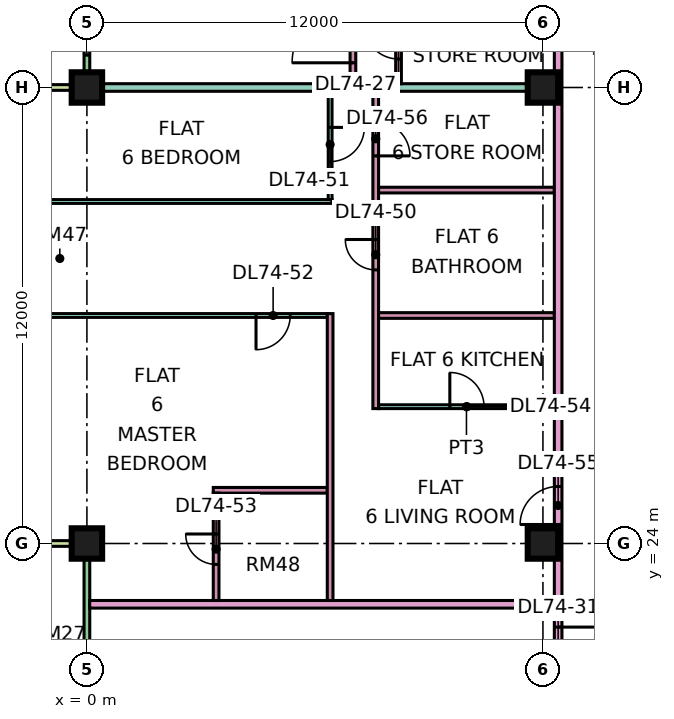
"""IFC4 building model, lengths in metres.
Left out: names, types, materials, properties, quantities, classifications, styles, units other than length and angle.
Written with IfcOpenShell. Run it as: python <this file> out.ifc"""

import sys

from ifc_helpers import new_model, si_unit, direction, frame, frame_2d, origin, origin_2d, place, context, subcontext, project, spatial, rectangle, extrude, element, fill, save


model = new_model("IFC4")
c1 = context("Model", 3, precision=1e-05, world=origin(), true_north=direction((0.0, 1.0)))
c2 = subcontext(c1, "Body", "Model", "MODEL_VIEW")
j1 = project(units=[si_unit("LENGTHUNIT", "METRE"), si_unit("PLANEANGLEUNIT", "RADIAN")], contexts=[c1])
p1 = place(None, origin())
s1 = spatial("IfcSite", under=j1, at=p1, CompositionType="ELEMENT")
p2 = place(p1, origin())
s2 = spatial("IfcBuilding", under=s1, at=p2, CompositionType="ELEMENT")
p3 = place(p2, frame((0.0, 0.0, 314.65)))
s3 = spatial("IfcBuildingStorey", under=s2, at=p3, CompositionType="ELEMENT", Elevation=314.65)
p4 = place(p3, frame((0.0, 24.0, 0.0), z_axis=(0.0, 0.0, 1.0), x_axis=(1.0, 0.0, 0.0)))
e1 = element("IfcColumn", 1, at=p4, inside=s3, PredefinedType="COLUMN", context=c2, shape_type="SweptSolid", body=[
    extrude(rectangle(XDim=0.8, YDim=0.8, at=origin_2d()), origin(), (0.0, 0.0, 1.0), 3.75),
])
p5 = place(p3, frame((0.0, 36.0, 0.0), z_axis=(0.0, 0.0, 1.0), x_axis=(1.0, 0.0, 0.0)))
e2 = element("IfcColumn", 2, at=p5, inside=s3, PredefinedType="COLUMN", context=c2, shape_type="SweptSolid", body=[
    extrude(rectangle(XDim=0.8, YDim=0.8, at=origin_2d()), origin(), (0.0, 0.0, 1.0), 3.75),
])
for number, where, z_axis, x_axis in (
    (3, (12.0, 24.0, 0.0), (0.0, 0.0, 1.0), (1.0, 0.0, 0.0)),
    (4, (12.0, 36.0, 0.0), (0.0, 0.0, 1.0), (1.0, 0.0, 0.0)),
):
    element("IfcColumn", number, at=place(p3, frame(where, z_axis=z_axis, x_axis=x_axis)), inside=s3, PredefinedType="COLUMN", context=c2, shape_type="SweptSolid", body=[
        extrude(rectangle(XDim=0.8, YDim=0.8, at=origin_2d()), origin(), (0.0, 0.0, 1.0), 3.75),
    ])
p6 = place(p3, frame((0.0, 47.925, 0.0), z_axis=(0.0, 0.0, 1.0), x_axis=(0.0, -1.0, 0.0)))
e5 = element("IfcWall", 5, at=p6, inside=s3, PredefinedType="SOLIDWALL", context=c2, shape_type="SweptSolid", body=[
    extrude(rectangle(XDim=11.85, YDim=0.15, at=frame_2d((5.925, 0.0))), origin(), (0.0, 0.0, 1.0), 3.35),
])
p7 = place(p6, frame((0.613, 0.0, 0.0)))
e6 = element("IfcOpeningElement", 6, at=p7, cuts=e5, PredefinedType="OPENING", context=c2, shape_type="SweptSolid", body=[
    extrude(rectangle(XDim=1.2, YDim=2.4, at=frame_2d((0.6, 1.2))), frame((0.0, 0.085, 0.0), z_axis=(0.0, -1.0, 0.0), x_axis=(1.0, 0.0, 0.0)), (0.0, 0.0, 1.0), 0.17),
])
p8 = place(p6, frame((4.675, 0.0, 0.45)))
e7 = element("IfcOpeningElement", 7, at=p8, cuts=e5, PredefinedType="OPENING", context=c2, shape_type="SweptSolid", body=[
    extrude(rectangle(XDim=3.0, YDim=2.4, at=frame_2d((1.5, 1.2))), frame((0.0, 0.085, 0.0), z_axis=(0.0, -1.0, 0.0), x_axis=(1.0, 0.0, 0.0)), (0.0, 0.0, 1.0), 0.17),
])
p9 = place(p6, frame((9.275, 0.0, 0.45)))
e8 = element("IfcOpeningElement", 8, at=p9, cuts=e5, PredefinedType="OPENING", context=c2, shape_type="SweptSolid", body=[
    extrude(rectangle(XDim=1.8, YDim=2.4, at=frame_2d((0.9, 1.2))), frame((0.0, 0.085, 0.0), z_axis=(0.0, -1.0, 0.0), x_axis=(1.0, 0.0, 0.0)), (0.0, 0.0, 1.0), 0.17),
])
p10 = place(p3, frame((-1.5, 36.0, 0.0), z_axis=(0.0, 0.0, 1.0), x_axis=(1.0, 0.0, 0.0)))
e9 = element("IfcWall", 9, at=p10, inside=s3, PredefinedType="SOLIDWALL", context=c2, shape_type="SweptSolid", body=[
    extrude(rectangle(XDim=1.5, YDim=0.15, at=frame_2d((0.75, 0.0))), origin(), (0.0, 0.0, 1.0), 3.35),
])
p11 = place(p3, frame((0.0, 23.925, 0.0), z_axis=(0.0, 0.0, 1.0), x_axis=(0.0, -1.0, 0.0)))
e10 = element("IfcWall", 10, at=p11, inside=s3, PredefinedType="SOLIDWALL", context=c2, shape_type="SweptSolid", body=[
    extrude(rectangle(XDim=11.35, YDim=0.15, at=frame_2d((5.675, 0.0))), origin(), (0.0, 0.0, 1.0), 3.35),
])
p12 = place(p11, frame((6.738, 0.0, 0.0)))
e11 = element("IfcOpeningElement", 11, at=p12, cuts=e10, PredefinedType="OPENING", context=c2, shape_type="SweptSolid", body=[
    extrude(rectangle(XDim=1.8, YDim=2.4, at=frame_2d((0.9, 1.2))), frame((0.0, 0.085, 0.0), z_axis=(0.0, -1.0, 0.0), x_axis=(1.0, 0.0, 0.0)), (0.0, 0.0, 1.0), 0.17),
])
p13 = place(p3, frame((-1.5, 24.0, 0.0), z_axis=(0.0, 0.0, 1.0), x_axis=(1.0, 0.0, 0.0)))
e12 = element("IfcWall", 12, at=p13, inside=s3, PredefinedType="SOLIDWALL", context=c2, shape_type="SweptSolid", body=[
    extrude(rectangle(XDim=1.5, YDim=0.15, at=frame_2d((0.75, 0.0))), origin(), (0.0, 0.0, 1.0), 3.35),
])
p14 = place(p3, frame((-1.35, 30.0, 0.0), z_axis=(0.0, 0.0, 1.0), x_axis=(1.0, 0.0, 0.0)))
e13 = element("IfcWall", 13, at=p14, inside=s3, PredefinedType="PARTITIONING", context=c2, shape_type="SweptSolid", body=[
    extrude(rectangle(XDim=7.675, YDim=0.1, at=frame_2d((3.837, 0.0))), origin(), (0.0, 0.0, 1.0), 3.35),
])
p15 = place(p14, frame((5.8, 0.0, 0.0)))
e14 = element("IfcOpeningElement", 14, at=p15, cuts=e13, PredefinedType="OPENING", context=c2, shape_type="SweptSolid", body=[
    extrude(rectangle(XDim=0.9, YDim=2.1, at=frame_2d((0.45, 1.05))), frame((0.0, 0.06, 0.0), z_axis=(0.0, -1.0, 0.0), x_axis=(1.0, 0.0, 0.0)), (0.0, 0.0, 1.0), 0.12),
])
p16 = place(p3, frame((-1.35, 33.0, 0.0), z_axis=(0.0, 0.0, 1.0), x_axis=(1.0, 0.0, 0.0)))
e15 = element("IfcWall", 15, at=p16, inside=s3, PredefinedType="PARTITIONING", context=c2, shape_type="SweptSolid", body=[
    extrude(rectangle(XDim=7.8, YDim=0.1, at=frame_2d((3.9, 0.0))), origin(), (0.0, 0.0, 1.0), 3.35),
])
e16 = element("IfcWall", 16, at=p5, inside=s3, PredefinedType="PARTITIONING", context=c2, shape_type="SweptSolid", body=[
    extrude(rectangle(XDim=12.3, YDim=0.2, at=frame_2d((6.15, 0.0))), origin(), (0.0, 0.0, 1.0), 3.35),
])
p17 = place(p3, frame((0.074, 22.4, 0.0), z_axis=(0.0, 0.0, 1.0), x_axis=(1.0, 0.0, 0.0)))
e17 = element("IfcWall", 17, at=p17, inside=s3, PredefinedType="PARTITIONING", context=c2, shape_type="SweptSolid", body=[
    extrude(rectangle(XDim=12.226, YDim=0.2, at=frame_2d((6.113, 0.0))), origin(), (0.0, 0.0, 1.0), 3.35),
])
p18 = place(p3, frame((3.325, 25.4, 0.0), z_axis=(0.0, 0.0, 1.0), x_axis=(1.0, 0.0, 0.0)))
e18 = element("IfcWall", 18, at=p18, inside=s3, PredefinedType="PARTITIONING", context=c2, shape_type="SweptSolid", body=[
    extrude(rectangle(XDim=3.0, YDim=0.15, at=frame_2d((1.5, 0.0))), origin(), (0.0, 0.0, 1.0), 3.35),
])
p19 = place(p3, frame((3.4, 22.5, 0.0), z_axis=(0.0, 0.0, 1.0), x_axis=(0.0, 1.0, 0.0)))
e19 = element("IfcWall", 19, at=p19, inside=s3, PredefinedType="PARTITIONING", context=c2, shape_type="SweptSolid", body=[
    extrude(rectangle(XDim=2.825, YDim=0.15, at=frame_2d((1.413, 0.0))), origin(), (0.0, 0.0, 1.0), 3.35),
])
p20 = place(p19, frame((0.95, 0.0, 0.0)))
e20 = element("IfcOpeningElement", 20, at=p20, cuts=e19, PredefinedType="OPENING", context=c2, shape_type="SweptSolid", body=[
    extrude(rectangle(XDim=0.8, YDim=2.1, at=frame_2d((0.4, 1.05))), frame((0.0, 0.085, 0.0), z_axis=(0.0, -1.0, 0.0), x_axis=(1.0, 0.0, 0.0)), (0.0, 0.0, 1.0), 0.17),
])
p21 = place(p3, frame((6.4, 22.5, 0.0), z_axis=(0.0, 0.0, 1.0), x_axis=(0.0, 1.0, 0.0)))
e21 = element("IfcWall", 21, at=p21, inside=s3, PredefinedType="PARTITIONING", context=c2, shape_type="SweptSolid", body=[
    extrude(rectangle(XDim=7.55, YDim=0.15, at=frame_2d((3.775, 0.0))), origin(), (0.0, 0.0, 1.0), 3.35),
])
p22 = place(p3, frame((6.4, 33.05, 0.0), z_axis=(0.0, 0.0, 1.0), x_axis=(0.0, 1.0, 0.0)))
e22 = element("IfcWall", 22, at=p22, inside=s3, PredefinedType="PARTITIONING", context=c2, shape_type="SweptSolid", body=[
    extrude(rectangle(XDim=2.85, YDim=0.1, at=frame_2d((1.425, 0.0))), origin(), (0.0, 0.0, 1.0), 3.35),
])
p23 = place(p22, frame((1.0, 0.0, 0.0)))
e23 = element("IfcOpeningElement", 23, at=p23, cuts=e22, PredefinedType="OPENING", context=c2, shape_type="SweptSolid", body=[
    extrude(rectangle(XDim=0.9, YDim=2.1, at=frame_2d((0.45, 1.05))), frame((0.0, 0.06, 0.0), z_axis=(0.0, -1.0, 0.0), x_axis=(1.0, 0.0, 0.0)), (0.0, 0.0, 1.0), 0.12),
])
p24 = place(p3, frame((7.0, 36.1, 0.0), z_axis=(0.0, 0.0, 1.0), x_axis=(0.0, 1.0, 0.0)))
e24 = element("IfcWall", 24, at=p24, inside=s3, PredefinedType="PARTITIONING", context=c2, shape_type="SweptSolid", body=[
    extrude(rectangle(XDim=8.95, YDim=0.15, at=frame_2d((4.475, 0.0))), origin(), (0.0, 0.0, 1.0), 3.35),
])
p25 = place(p24, frame((6.95, 0.0, 0.0)))
e25 = element("IfcOpeningElement", 25, at=p25, cuts=e24, PredefinedType="OPENING", context=c2, shape_type="SweptSolid", body=[
    extrude(rectangle(XDim=0.9, YDim=2.1, at=frame_2d((0.45, 1.05))), frame((0.0, 0.085, 0.0), z_axis=(0.0, -1.0, 0.0), x_axis=(1.0, 0.0, 0.0)), (0.0, 0.0, 1.0), 0.17),
])
p26 = place(p24, frame((0.55, 0.0, 0.0)))
e26 = element("IfcOpeningElement", 26, at=p26, cuts=e24, PredefinedType="OPENING", context=c2, shape_type="SweptSolid", body=[
    extrude(rectangle(XDim=1.6, YDim=2.1, at=frame_2d((0.8, 1.05))), frame((0.0, 0.085, 0.0), z_axis=(0.0, -1.0, 0.0), x_axis=(1.0, 0.0, 0.0)), (0.0, 0.0, 1.0), 0.17),
])
p27 = place(p3, frame((7.6, 27.55, 0.0), z_axis=(0.0, 0.0, 1.0), x_axis=(0.0, 1.0, 0.0)))
e27 = element("IfcWall", 27, at=p27, inside=s3, PredefinedType="PARTITIONING", context=c2, shape_type="SweptSolid", body=[
    extrude(rectangle(XDim=8.35, YDim=0.15, at=frame_2d((4.175, 0.0))), origin(), (0.0, 0.0, 1.0), 3.35),
])
p28 = place(p27, frame((3.65, 0.0, 0.0)))
e28 = element("IfcOpeningElement", 28, at=p28, cuts=e27, PredefinedType="OPENING", context=c2, shape_type="SweptSolid", body=[
    extrude(rectangle(XDim=0.8, YDim=2.1, at=frame_2d((0.4, 1.05))), frame((0.0, 0.085, 0.0), z_axis=(0.0, -1.0, 0.0), x_axis=(1.0, 0.0, 0.0)), (0.0, 0.0, 1.0), 0.17),
])
p29 = place(p27, frame((6.65, 0.0, 0.0)))
e29 = element("IfcOpeningElement", 29, at=p29, cuts=e27, PredefinedType="OPENING", context=c2, shape_type="SweptSolid", body=[
    extrude(rectangle(XDim=0.9, YDim=2.1, at=frame_2d((0.45, 1.05))), frame((0.0, 0.085, 0.0), z_axis=(0.0, -1.0, 0.0), x_axis=(1.0, 0.0, 0.0)), (0.0, 0.0, 1.0), 0.17),
])
p30 = place(p3, frame((7.675, 27.6, 0.0), z_axis=(0.0, 0.0, 1.0), x_axis=(1.0, 0.0, 0.0)))
e30 = element("IfcWall", 30, at=p30, inside=s3, PredefinedType="PARTITIONING", context=c2, shape_type="SweptSolid", body=[
    extrude(rectangle(XDim=4.625, YDim=0.1, at=frame_2d((2.312, 0.0))), origin(), (0.0, 0.0, 1.0), 3.35),
])
p31 = place(p30, frame((1.875, 0.0, 0.0)))
e31 = element("IfcOpeningElement", 31, at=p31, cuts=e30, PredefinedType="OPENING", context=c2, shape_type="SweptSolid", body=[
    extrude(rectangle(XDim=0.9, YDim=2.1, at=frame_2d((0.45, 1.05))), frame((0.0, 0.06, 0.0), z_axis=(0.0, -1.0, 0.0), x_axis=(1.0, 0.0, 0.0)), (0.0, 0.0, 1.0), 0.12),
])
for number, where, z_axis, x_axis in (
    (32, (7.675, 30.0, 0.0), (0.0, 0.0, 1.0), (1.0, 0.0, 0.0)),
    (33, (7.675, 33.3, 0.0), (0.0, 0.0, 1.0), (1.0, 0.0, 0.0)),
):
    element("IfcWall", number, at=place(p3, frame(where, z_axis=z_axis, x_axis=x_axis)), inside=s3, PredefinedType="PARTITIONING", context=c2, shape_type="SweptSolid", body=[
        extrude(rectangle(XDim=4.625, YDim=0.15, at=frame_2d((2.312, 0.0))), origin(), (0.0, 0.0, 1.0), 3.35),
    ])
p32 = place(p3, frame((8.2, 36.1, 0.0), z_axis=(0.0, 0.0, 1.0), x_axis=(0.0, 1.0, 0.0)))
e34 = element("IfcWall", 34, at=p32, inside=s3, PredefinedType="PARTITIONING", context=c2, shape_type="SweptSolid", body=[
    extrude(rectangle(XDim=14.65, YDim=0.15, at=frame_2d((7.325, 0.0))), origin(), (0.0, 0.0, 1.0), 3.35),
])
p33 = place(p32, frame((9.65, 0.0, 0.0)))
e35 = element("IfcOpeningElement", 35, at=p33, cuts=e34, PredefinedType="OPENING", context=c2, shape_type="SweptSolid", body=[
    extrude(rectangle(XDim=0.8, YDim=2.1, at=frame_2d((0.4, 1.05))), frame((0.0, 0.085, 0.0), z_axis=(0.0, -1.0, 0.0), x_axis=(1.0, 0.0, 0.0)), (0.0, 0.0, 1.0), 0.17),
])
p34 = place(p32, frame((5.15, 0.0, 0.0)))
e36 = element("IfcOpeningElement", 36, at=p34, cuts=e34, PredefinedType="OPENING", context=c2, shape_type="SweptSolid", body=[
    extrude(rectangle(XDim=0.9, YDim=2.1, at=frame_2d((0.45, 1.05))), frame((0.0, 0.085, 0.0), z_axis=(0.0, -1.0, 0.0), x_axis=(1.0, 0.0, 0.0)), (0.0, 0.0, 1.0), 0.17),
])
p35 = place(p32, frame((0.65, 0.0, 0.0)))
e37 = element("IfcOpeningElement", 37, at=p35, cuts=e34, PredefinedType="OPENING", context=c2, shape_type="SweptSolid", body=[
    extrude(rectangle(XDim=0.9, YDim=2.1, at=frame_2d((0.45, 1.05))), frame((0.0, 0.085, 0.0), z_axis=(0.0, -1.0, 0.0), x_axis=(1.0, 0.0, 0.0)), (0.0, 0.0, 1.0), 0.17),
])
p36 = place(p3, frame((12.4, 20.0, 0.0), z_axis=(0.0, 0.0, 1.0), x_axis=(0.0, 1.0, 0.0)))
e38 = element("IfcWall", 38, at=p36, inside=s3, PredefinedType="PARTITIONING", context=c2, shape_type="SweptSolid", body=[
    extrude(rectangle(XDim=33.926, YDim=0.2, at=frame_2d((16.963, 0.0))), origin(), (0.0, 0.0, 1.0), 3.35),
])
p37 = place(p36, frame((31.8, 0.0, 0.0)))
e39 = element("IfcOpeningElement", 39, at=p37, cuts=e38, PredefinedType="OPENING", context=c2, shape_type="SweptSolid", body=[
    extrude(rectangle(XDim=1.0, YDim=2.1, at=frame_2d((0.5, 1.05))), frame((0.0, 0.11, 0.0), z_axis=(0.0, -1.0, 0.0), x_axis=(1.0, 0.0, 0.0)), (0.0, 0.0, 1.0), 0.22),
])
p38 = place(p36, frame((0.6, 0.0, 0.0)))
e40 = element("IfcOpeningElement", 40, at=p38, cuts=e38, PredefinedType="OPENING", context=c2, shape_type="SweptSolid", body=[
    extrude(rectangle(XDim=1.2, YDim=2.1, at=frame_2d((0.6, 1.05))), frame((0.0, 0.11, 0.0), z_axis=(0.0, -1.0, 0.0), x_axis=(1.0, 0.0, 0.0)), (0.0, 0.0, 1.0), 0.22),
])
p39 = place(p36, frame((4.5, 0.0, 0.0)))
e41 = element("IfcOpeningElement", 41, at=p39, cuts=e38, PredefinedType="OPENING", context=c2, shape_type="SweptSolid", body=[
    extrude(rectangle(XDim=1.0, YDim=2.1, at=frame_2d((0.5, 1.05))), frame((0.0, 0.11, 0.0), z_axis=(0.0, -1.0, 0.0), x_axis=(1.0, 0.0, 0.0)), (0.0, 0.0, 1.0), 0.22),
])
p40 = place(p9, origin())
e42 = element("IfcWindow", 42, at=p40, inside=s3, PartitioningType="SINGLE_PANEL", PredefinedType="WINDOW", context=c2, shape_type="SweptSolid", body=[
    extrude(rectangle(XDim=1.8, YDim=2.4, at=frame_2d((0.9, 1.2))), frame((0.0, 0.03, 0.0), z_axis=(0.0, -1.0, 0.0), x_axis=(1.0, 0.0, 0.0)), (0.0, 0.0, 1.0), 0.06),
])
fill(e8, e42)
p41 = place(p26, origin())
e43 = element("IfcDoor", 43, at=p41, inside=s3, OperationType="DOUBLE_DOOR_SINGLE_SWING", PredefinedType="DOOR", context=c2, shape_type="SweptSolid", body=[
    extrude(rectangle(XDim=1.6, YDim=2.1, at=frame_2d((0.8, 1.05))), frame((0.0, 0.025, 0.0), z_axis=(0.0, -1.0, 0.0), x_axis=(1.0, 0.0, 0.0)), (0.0, 0.0, 1.0), 0.05),
])
fill(e26, e43)
p42 = place(p35, frame((0.9, 0.0, 0.0), z_axis=(0.0, 0.0, 1.0), x_axis=(-1.0, 0.0, 0.0)))
e44 = element("IfcDoor", 44, at=p42, inside=s3, OperationType="SINGLE_SWING_RIGHT", PredefinedType="DOOR", context=c2, shape_type="SweptSolid", body=[
    extrude(rectangle(XDim=0.9, YDim=2.1, at=frame_2d((0.45, 1.05))), frame((0.0, 0.025, 0.0), z_axis=(0.0, -1.0, 0.0), x_axis=(1.0, 0.0, 0.0)), (0.0, 0.0, 1.0), 0.05),
])
fill(e37, e44)
p43 = place(p38, origin())
e45 = element("IfcDoor", 45, at=p43, inside=s3, OperationType="SINGLE_SWING_RIGHT", PredefinedType="DOOR", context=c2, shape_type="SweptSolid", body=[
    extrude(rectangle(XDim=1.2, YDim=2.1, at=frame_2d((0.6, 1.05))), frame((0.0, 0.025, 0.0), z_axis=(0.0, -1.0, 0.0), x_axis=(1.0, 0.0, 0.0)), (0.0, 0.0, 1.0), 0.05),
])
fill(e40, e45)
p44 = place(p28, frame((0.8, 0.0, 0.0), z_axis=(0.0, 0.0, 1.0), x_axis=(-1.0, 0.0, 0.0)))
e46 = element("IfcDoor", 46, at=p44, inside=s3, OperationType="SINGLE_SWING_RIGHT", PredefinedType="DOOR", context=c2, shape_type="SweptSolid", body=[
    extrude(rectangle(XDim=0.8, YDim=2.1, at=frame_2d((0.4, 1.05))), frame((0.0, 0.025, 0.0), z_axis=(0.0, -1.0, 0.0), x_axis=(1.0, 0.0, 0.0)), (0.0, 0.0, 1.0), 0.05),
])
fill(e28, e46)
p45 = place(p23, origin())
e47 = element("IfcDoor", 47, at=p45, inside=s3, OperationType="SINGLE_SWING_RIGHT", PredefinedType="DOOR", context=c2, shape_type="SweptSolid", body=[
    extrude(rectangle(XDim=0.9, YDim=2.1, at=frame_2d((0.45, 1.05))), frame((0.0, 0.025, 0.0), z_axis=(0.0, -1.0, 0.0), x_axis=(1.0, 0.0, 0.0)), (0.0, 0.0, 1.0), 0.05),
])
fill(e23, e47)
p46 = place(p15, frame((0.9, 0.0, 0.0), z_axis=(0.0, 0.0, 1.0), x_axis=(-1.0, 0.0, 0.0)))
e48 = element("IfcDoor", 48, at=p46, inside=s3, OperationType="SINGLE_SWING_LEFT", PredefinedType="DOOR", context=c2, shape_type="SweptSolid", body=[
    extrude(rectangle(XDim=0.9, YDim=2.1, at=frame_2d((0.45, 1.05))), frame((0.0, 0.025, 0.0), z_axis=(0.0, -1.0, 0.0), x_axis=(1.0, 0.0, 0.0)), (0.0, 0.0, 1.0), 0.05),
])
fill(e14, e48)
p47 = place(p20, frame((0.8, 0.0, 0.0), z_axis=(0.0, 0.0, 1.0), x_axis=(-1.0, 0.0, 0.0)))
e49 = element("IfcDoor", 49, at=p47, inside=s3, OperationType="SINGLE_SWING_RIGHT", PredefinedType="DOOR", context=c2, shape_type="SweptSolid", body=[
    extrude(rectangle(XDim=0.8, YDim=2.1, at=frame_2d((0.4, 1.05))), frame((0.0, 0.025, 0.0), z_axis=(0.0, -1.0, 0.0), x_axis=(1.0, 0.0, 0.0)), (0.0, 0.0, 1.0), 0.05),
])
fill(e20, e49)
p48 = place(p31, origin())
e50 = element("IfcDoor", 50, at=p48, inside=s3, OperationType="SINGLE_SWING_LEFT", PredefinedType="DOOR", context=c2, shape_type="SweptSolid", body=[
    extrude(rectangle(XDim=0.9, YDim=2.1, at=frame_2d((0.45, 1.05))), frame((0.0, 0.025, 0.0), z_axis=(0.0, -1.0, 0.0), x_axis=(1.0, 0.0, 0.0)), (0.0, 0.0, 1.0), 0.05),
])
fill(e31, e50)
p49 = place(p39, origin())
e51 = element("IfcDoor", 51, at=p49, inside=s3, OperationType="SINGLE_SWING_LEFT", PredefinedType="DOOR", context=c2, shape_type="SweptSolid", body=[
    extrude(rectangle(XDim=1.0, YDim=2.1, at=frame_2d((0.5, 1.05))), frame((0.0, 0.025, 0.0), z_axis=(0.0, -1.0, 0.0), x_axis=(1.0, 0.0, 0.0)), (0.0, 0.0, 1.0), 0.05),
])
fill(e41, e51)
p50 = place(p29, frame((0.9, 0.0, 0.0), z_axis=(0.0, 0.0, 1.0), x_axis=(-1.0, 0.0, 0.0)))
e52 = element("IfcDoor", 52, at=p50, inside=s3, OperationType="SINGLE_SWING_LEFT", PredefinedType="DOOR", context=c2, shape_type="SweptSolid", body=[
    extrude(rectangle(XDim=0.9, YDim=2.1, at=frame_2d((0.45, 1.05))), frame((0.0, 0.025, 0.0), z_axis=(0.0, -1.0, 0.0), x_axis=(1.0, 0.0, 0.0)), (0.0, 0.0, 1.0), 0.05),
])
fill(e29, e52)
save(model, sys.argv[1])
